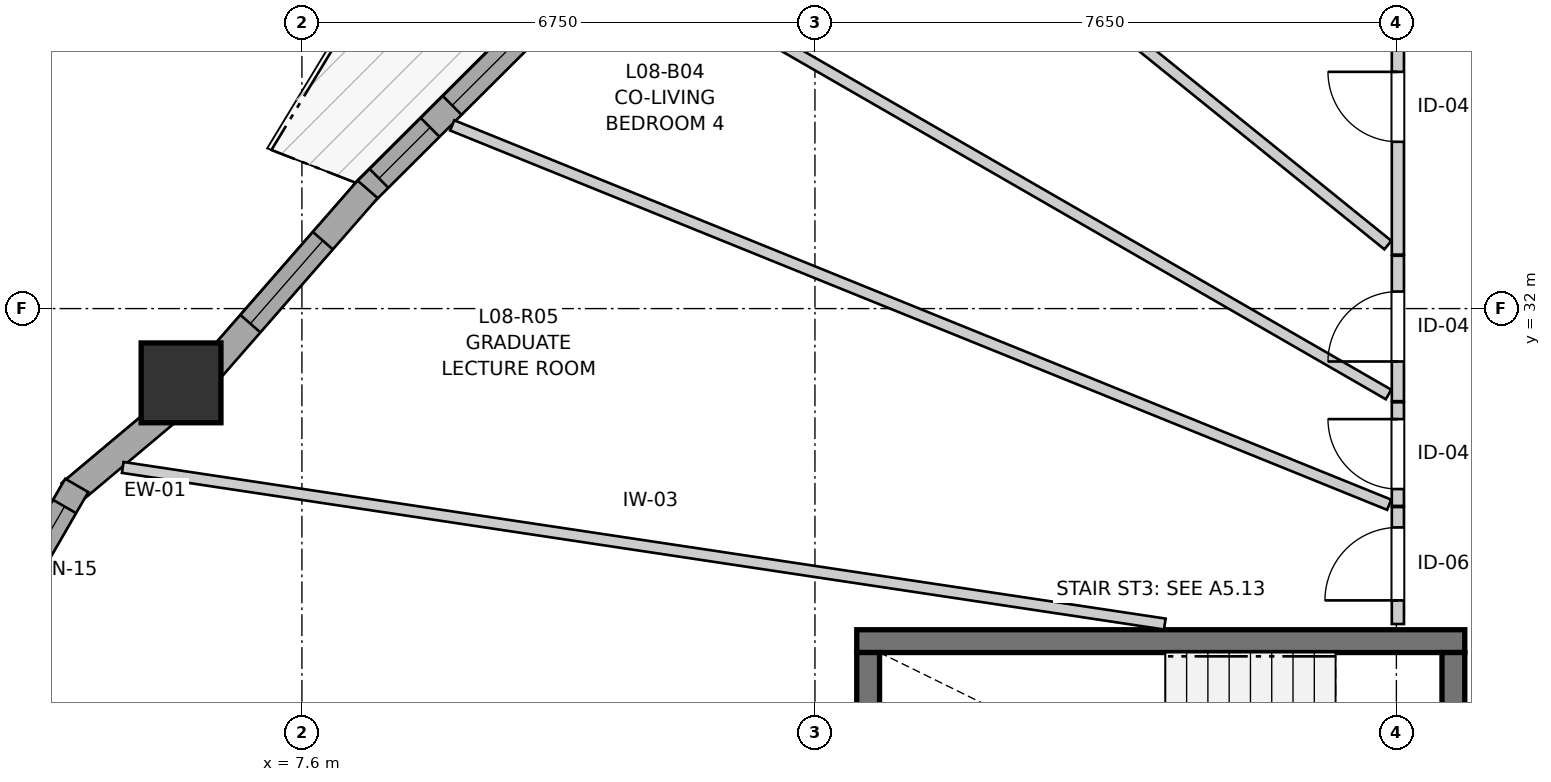
"""IFC4 building model, lengths in metres.
Left out: names, types, materials, properties, quantities, classifications, styles, units other than length and angle.
Written with IfcOpenShell. Run it as: python <this file> out.ifc"""

import sys

from ifc_helpers import new_model, si_unit, direction, frame, frame_2d, origin, origin_2d, place, context, subcontext, project, spatial, rectangle, extrude, source, transform, mapped, element, fill, save


model = new_model("IFC4")
c1 = context("Model", 3, precision=1e-05, world=origin(), true_north=direction((0.0, 1.0)))
c2 = subcontext(c1, "Body", "Model", "MODEL_VIEW")
j1 = project(units=[si_unit("LENGTHUNIT", "METRE"), si_unit("PLANEANGLEUNIT", "RADIAN")], contexts=[c1])
p1 = place(None, origin())
s1 = spatial("IfcSite", under=j1, at=p1, CompositionType="ELEMENT")
p2 = place(p1, origin())
s2 = spatial("IfcBuilding", under=s1, at=p2, CompositionType="ELEMENT")
p3 = place(p2, frame((0.0, 0.0, 30.2)))
s3 = spatial("IfcBuildingStorey", under=s2, at=p3, CompositionType="ELEMENT", Elevation=30.2)
p4 = place(p3, frame((22.9, 27.625, 0.0), z_axis=(0.0, 0.0, 1.0), x_axis=(-1.0, 0.0, 0.0)))
e1 = element("IfcWall", 1, at=p4, inside=s3, PredefinedType="SHEAR", context=c2, shape_type="SweptSolid", body=[
    extrude(rectangle(XDim=8.0, YDim=0.3, at=frame_2d((4.0, 0.0))), origin(), (0.0, 0.0, 1.0), 2.935),
])
p5 = place(p3, frame((15.05, 27.475, 0.0), z_axis=(0.0, 0.0, 1.0), x_axis=(0.0, -1.0, 0.0)))
e2 = element("IfcWall", 2, at=p5, inside=s3, PredefinedType="SHEAR", context=c2, shape_type="SweptSolid", body=[
    extrude(rectangle(XDim=2.95, YDim=0.3, at=frame_2d((1.475, 0.0))), origin(), (0.0, 0.0, 1.0), 2.935),
])
p6 = place(p3, frame((22.75, 24.525, 0.0), z_axis=(0.0, 0.0, 1.0), x_axis=(0.0, 1.0, 0.0)))
e3 = element("IfcWall", 3, at=p6, inside=s3, PredefinedType="SHEAR", context=c2, shape_type="SweptSolid", body=[
    extrude(rectangle(XDim=2.95, YDim=0.3, at=frame_2d((1.475, 0.0))), origin(), (0.0, 0.0, 1.0), 2.935),
])
p7 = place(p6, frame((0.985, 0.0, 0.0)))
e4 = element("IfcOpeningElement", 4, at=p7, cuts=e3, PredefinedType="OPENING", context=c2, shape_type="SweptSolid", body=[
    extrude(rectangle(XDim=0.98, YDim=2.15, at=frame_2d((0.49, 1.075))), frame((0.0, 0.16, 0.0), z_axis=(0.0, -1.0, 0.0), x_axis=(1.0, 0.0, 0.0)), (0.0, 0.0, 1.0), 0.32),
])
m1 = source(origin(), c2, "Body", "SweptSolid", [
    extrude(rectangle(XDim=1.05, YDim=1.05, at=origin_2d()), origin(), (0.0, 0.0, 1.0), 2.935),
])
p8 = place(p3, frame((6.01, 31.023, 0.0), z_axis=(0.0, 0.0, 1.0), x_axis=(1.0, 0.0, 0.0)))
e5 = element("IfcColumn", 5, at=p8, inside=s3, PredefinedType="COLUMN", context=c2, shape_type="MappedRepresentation", body=[
    mapped(m1, transform((0.0, 0.0, 0.0), x_axis=(1.0, 0.0, 0.0), y_axis=(0.0, 1.0, 0.0), z_axis=(0.0, 0.0, 1.0), scale=1.0)),
])
p9 = place(p3, frame((5.893, 30.696, 0.0), z_axis=(0.0, 0.0, 1.0), x_axis=(-0.766001205563, -0.64283913468, 0.0)))
e6 = element("IfcWall", 6, at=p9, inside=s3, PredefinedType="SOLIDWALL", context=c2, shape_type="SweptSolid", body=[
    extrude(rectangle(XDim=1.752, YDim=0.35, at=frame_2d((0.876, 0.0))), origin(), (0.0, 0.0, 1.0), 2.415),
])
p10 = place(p3, frame((4.637, 29.674, 0.0), z_axis=(0.0, 0.0, 1.0), x_axis=(-0.499995423472, -0.866028046028, 0.0)))
e7 = element("IfcWall", 7, at=p10, inside=s3, PredefinedType="SOLIDWALL", context=c2, shape_type="SweptSolid", body=[
    extrude(rectangle(XDim=2.09, YDim=0.35, at=frame_2d((1.045, 0.0))), origin(), (0.0, 0.0, 1.0), 2.415),
])
p11 = place(p10, frame((0.32, 0.0, 0.82)))
e8 = element("IfcOpeningElement", 8, at=p11, cuts=e7, PredefinedType="OPENING", context=c2, shape_type="SweptSolid", body=[
    extrude(rectangle(XDim=1.45, YDim=1.25, at=frame_2d((0.725, 0.625))), frame((0.0, 0.185, 0.0), z_axis=(0.0, -1.0, 0.0), x_axis=(1.0, 0.0, 0.0)), (0.0, 0.0, 1.0), 0.37),
])
p12 = place(p3, frame((10.841, 35.932, 0.0), z_axis=(0.0, 0.0, 1.0), x_axis=(-0.708383272101, -0.70582798174, 0.0)))
e9 = element("IfcWall", 9, at=p12, inside=s3, PredefinedType="SOLIDWALL", context=c2, shape_type="SweptSolid", body=[
    extrude(rectangle(XDim=3.439, YDim=0.35, at=frame_2d((1.72, 0.0))), origin(), (0.0, 0.0, 1.0), 2.415),
])
p13 = place(p12, frame((0.334, 0.0, 0.82)))
e10 = element("IfcOpeningElement", 10, at=p13, cuts=e9, PredefinedType="OPENING", context=c2, shape_type="SweptSolid", body=[
    extrude(rectangle(XDim=1.45, YDim=1.25, at=frame_2d((0.725, 0.625))), frame((0.0, 0.185, 0.0), z_axis=(0.0, -1.0, 0.0), x_axis=(1.0, 0.0, 0.0)), (0.0, 0.0, 1.0), 0.37),
])
p14 = place(p12, frame((2.194, 0.0, 0.82)))
e11 = element("IfcOpeningElement", 11, at=p14, cuts=e9, PredefinedType="OPENING", context=c2, shape_type="SweptSolid", body=[
    extrude(rectangle(XDim=0.95, YDim=1.35, at=frame_2d((0.475, 0.675))), frame((0.0, 0.185, 0.0), z_axis=(0.0, -1.0, 0.0), x_axis=(1.0, 0.0, 0.0)), (0.0, 0.0, 1.0), 0.37),
])
p15 = place(p3, frame((8.465, 33.569, 0.0), z_axis=(0.0, 0.0, 1.0), x_axis=(-0.657600500685, -0.753366830634, 0.0)))
e12 = element("IfcWall", 12, at=p15, inside=s3, PredefinedType="SOLIDWALL", context=c2, shape_type="SweptSolid", body=[
    extrude(rectangle(XDim=3.233, YDim=0.35, at=frame_2d((1.616, 0.0))), origin(), (0.0, 0.0, 1.0), 2.415),
])
p16 = place(p15, frame((0.896, 0.0, 0.82)))
e13 = element("IfcOpeningElement", 13, at=p16, cuts=e12, PredefinedType="OPENING", context=c2, shape_type="SweptSolid", body=[
    extrude(rectangle(XDim=1.45, YDim=1.25, at=frame_2d((0.725, 0.625))), frame((0.0, 0.185, 0.0), z_axis=(0.0, -1.0, 0.0), x_axis=(1.0, 0.0, 0.0)), (0.0, 0.0, 1.0), 0.37),
])
p17 = place(p3, frame((22.02, 32.71, 0.0), z_axis=(0.0, 0.0, 1.0), x_axis=(0.0, 1.0, 0.0)))
e14 = element("IfcWall", 14, at=p17, inside=s3, PredefinedType="PARTITIONING", context=c2, shape_type="SweptSolid", body=[
    extrude(rectangle(XDim=3.87, YDim=0.16, at=frame_2d((1.935, 0.0))), origin(), (0.0, 0.0, 1.0), 2.935),
])
p18 = place(p17, frame((1.485, 0.0, 0.0)))
e15 = element("IfcOpeningElement", 15, at=p18, cuts=e14, PredefinedType="OPENING", context=c2, shape_type="SweptSolid", body=[
    extrude(rectangle(XDim=0.92, YDim=2.1, at=frame_2d((0.46, 1.05))), frame((0.0, 0.09, 0.0), z_axis=(0.0, -1.0, 0.0), x_axis=(1.0, 0.0, 0.0)), (0.0, 0.0, 1.0), 0.18),
])
p19 = place(p3, frame((22.02, 30.782, 0.0), z_axis=(0.0, 0.0, 1.0), x_axis=(0.0, 1.0, 0.0)))
e16 = element("IfcWall", 16, at=p19, inside=s3, PredefinedType="PARTITIONING", context=c2, shape_type="SweptSolid", body=[
    extrude(rectangle(XDim=1.913, YDim=0.16, at=frame_2d((0.957, 0.0))), origin(), (0.0, 0.0, 1.0), 2.935),
])
p20 = place(p19, frame((0.522, 0.0, 0.0)))
e17 = element("IfcOpeningElement", 17, at=p20, cuts=e16, PredefinedType="OPENING", context=c2, shape_type="SweptSolid", body=[
    extrude(rectangle(XDim=0.92, YDim=2.1, at=frame_2d((0.46, 1.05))), frame((0.0, 0.09, 0.0), z_axis=(0.0, -1.0, 0.0), x_axis=(1.0, 0.0, 0.0)), (0.0, 0.0, 1.0), 0.18),
])
p21 = place(p3, frame((22.02, 27.85, 0.0), z_axis=(0.0, 0.0, 1.0), x_axis=(0.0, 1.0, 0.0)))
e18 = element("IfcWall", 18, at=p21, inside=s3, PredefinedType="PARTITIONING", context=c2, shape_type="SweptSolid", body=[
    extrude(rectangle(XDim=1.539, YDim=0.16, at=frame_2d((0.77, 0.0))), origin(), (0.0, 0.0, 1.0), 2.935),
])
p22 = place(p21, frame((0.311, 0.0, 0.0)))
e19 = element("IfcOpeningElement", 19, at=p22, cuts=e18, PredefinedType="OPENING", context=c2, shape_type="SweptSolid", body=[
    extrude(rectangle(XDim=0.96, YDim=2.1, at=frame_2d((0.48, 1.05))), frame((0.0, 0.09, 0.0), z_axis=(0.0, -1.0, 0.0), x_axis=(1.0, 0.0, 0.0)), (0.0, 0.0, 1.0), 0.18),
])
p23 = place(p3, frame((22.02, 29.404, 0.0), z_axis=(0.0, 0.0, 1.0), x_axis=(0.0, 1.0, 0.0)))
e20 = element("IfcWall", 20, at=p23, inside=s3, PredefinedType="PARTITIONING", context=c2, shape_type="SweptSolid", body=[
    extrude(rectangle(XDim=1.363, YDim=0.16, at=frame_2d((0.682, 0.0))), origin(), (0.0, 0.0, 1.0), 2.935),
])
p24 = place(p23, frame((0.222, 0.0, 0.0)))
e21 = element("IfcOpeningElement", 21, at=p24, cuts=e20, PredefinedType="OPENING", context=c2, shape_type="SweptSolid", body=[
    extrude(rectangle(XDim=0.92, YDim=2.1, at=frame_2d((0.46, 1.05))), frame((0.0, 0.09, 0.0), z_axis=(0.0, -1.0, 0.0), x_axis=(1.0, 0.0, 0.0)), (0.0, 0.0, 1.0), 0.18),
])
p25 = place(p3, frame((5.242, 29.91, 0.0), z_axis=(0.0, 0.0, 1.0), x_axis=(0.988899381561, -0.148586719285, 0.0)))
e22 = element("IfcWall", 22, at=p25, inside=s3, PredefinedType="PARTITIONING", context=c2, shape_type="SweptSolid", body=[
    extrude(rectangle(XDim=13.864, YDim=0.145, at=frame_2d((6.932, 0.0))), origin(), (0.0, 0.0, 1.0), 2.935),
])
p26 = place(p3, frame((9.577, 34.41, 0.0), z_axis=(0.0, 0.0, 1.0), x_axis=(0.926920362809, -0.375258099194, 0.0)))
e23 = element("IfcWall", 23, at=p26, inside=s3, PredefinedType="PARTITIONING", context=c2, shape_type="SweptSolid", body=[
    extrude(rectangle(XDim=13.3, YDim=0.145, at=frame_2d((6.65, 0.0))), origin(), (0.0, 0.0, 1.0), 2.935),
])
p27 = place(p3, frame((11.92, 36.618, 0.0), z_axis=(0.0, 0.0, 1.0), x_axis=(0.866473494239, -0.499223080177, 0.0)))
e24 = element("IfcWall", 24, at=p27, inside=s3, PredefinedType="PARTITIONING", context=c2, shape_type="SweptSolid", body=[
    extrude(rectangle(XDim=11.514, YDim=0.145, at=frame_2d((5.757, 0.0))), origin(), (0.0, 0.0, 1.0), 2.935),
])
p28 = place(p3, frame((14.566, 38.751, 0.0), z_axis=(0.0, 0.0, 1.0), x_axis=(0.777881688073, -0.628410756879, 0.0)))
e25 = element("IfcWall", 25, at=p28, inside=s3, PredefinedType="PARTITIONING", context=c2, shape_type="SweptSolid", body=[
    extrude(rectangle(XDim=9.413, YDim=0.145, at=frame_2d((4.707, 0.0))), origin(), (0.0, 0.0, 1.0), 2.935),
])
m2 = source(origin(), c2, "Body", "SweptSolid", [
    extrude(rectangle(XDim=1.45, YDim=1.25, at=frame_2d((0.725, 0.625))), frame((0.0, 0.03, 0.0), z_axis=(0.0, -1.0, 0.0), x_axis=(1.0, 0.0, 0.0)), (0.0, 0.0, 1.0), 0.06),
])
p29 = place(p11, origin())
e26 = element("IfcWindow", 26, at=p29, inside=s3, PartitioningType="SINGLE_PANEL", PredefinedType="WINDOW", context=c2, shape_type="MappedRepresentation", body=[
    mapped(m2, transform((0.0, 0.0, 0.0), x_axis=(1.0, 0.0, 0.0), y_axis=(0.0, 1.0, 0.0), z_axis=(0.0, 0.0, 1.0), scale=1.0)),
])
fill(e8, e26)
p30 = place(p13, origin())
e27 = element("IfcWindow", 27, at=p30, inside=s3, PartitioningType="SINGLE_PANEL", PredefinedType="WINDOW", context=c2, shape_type="MappedRepresentation", body=[
    mapped(m2, transform((0.0, 0.0, 0.0), x_axis=(1.0, 0.0, 0.0), y_axis=(0.0, 1.0, 0.0), z_axis=(0.0, 0.0, 1.0), scale=1.0)),
])
fill(e10, e27)
m3 = source(origin(), c2, "Body", "SweptSolid", [
    extrude(rectangle(XDim=0.95, YDim=1.35, at=frame_2d((0.475, 0.675))), frame((0.0, 0.03, 0.0), z_axis=(0.0, -1.0, 0.0), x_axis=(1.0, 0.0, 0.0)), (0.0, 0.0, 1.0), 0.06),
])
p31 = place(p14, origin())
e28 = element("IfcWindow", 28, at=p31, inside=s3, PartitioningType="SINGLE_PANEL", PredefinedType="WINDOW", context=c2, shape_type="MappedRepresentation", body=[
    mapped(m3, transform((0.0, 0.0, 0.0), x_axis=(1.0, 0.0, 0.0), y_axis=(0.0, 1.0, 0.0), z_axis=(0.0, 0.0, 1.0), scale=1.0)),
])
fill(e11, e28)
p32 = place(p16, origin())
e29 = element("IfcWindow", 29, at=p32, inside=s3, PartitioningType="SINGLE_PANEL", PredefinedType="WINDOW", context=c2, shape_type="MappedRepresentation", body=[
    mapped(m2, transform((0.0, 0.0, 0.0), x_axis=(1.0, 0.0, 0.0), y_axis=(0.0, 1.0, 0.0), z_axis=(0.0, 0.0, 1.0), scale=1.0)),
])
fill(e13, e29)
m4 = source(origin(), c2, "Body", "SweptSolid", [
    extrude(rectangle(XDim=0.92, YDim=2.1, at=frame_2d((0.46, 1.05))), frame((0.0, 0.025, 0.0), z_axis=(0.0, -1.0, 0.0), x_axis=(1.0, 0.0, 0.0)), (0.0, 0.0, 1.0), 0.05),
])
p33 = place(p18, origin())
e30 = element("IfcDoor", 30, at=p33, inside=s3, OperationType="SINGLE_SWING_RIGHT", PredefinedType="DOOR", context=c2, shape_type="MappedRepresentation", body=[
    mapped(m4, transform((0.0, 0.0, 0.0), x_axis=(1.0, 0.0, 0.0), y_axis=(0.0, 1.0, 0.0), z_axis=(0.0, 0.0, 1.0), scale=1.0)),
])
fill(e15, e30)
p34 = place(p20, origin())
e31 = element("IfcDoor", 31, at=p34, inside=s3, OperationType="SINGLE_SWING_LEFT", PredefinedType="DOOR", context=c2, shape_type="MappedRepresentation", body=[
    mapped(m4, transform((0.0, 0.0, 0.0), x_axis=(1.0, 0.0, 0.0), y_axis=(0.0, 1.0, 0.0), z_axis=(0.0, 0.0, 1.0), scale=1.0)),
])
fill(e17, e31)
m5 = source(origin(), c2, "Body", "SweptSolid", [
    extrude(rectangle(XDim=0.96, YDim=2.1, at=frame_2d((0.48, 1.05))), frame((0.0, 0.025, 0.0), z_axis=(0.0, -1.0, 0.0), x_axis=(1.0, 0.0, 0.0)), (0.0, 0.0, 1.0), 0.05),
])
p35 = place(p22, origin())
e32 = element("IfcDoor", 32, at=p35, inside=s3, OperationType="SINGLE_SWING_LEFT", PredefinedType="DOOR", context=c2, shape_type="MappedRepresentation", body=[
    mapped(m5, transform((0.0, 0.0, 0.0), x_axis=(1.0, 0.0, 0.0), y_axis=(0.0, 1.0, 0.0), z_axis=(0.0, 0.0, 1.0), scale=1.0)),
])
fill(e19, e32)
p36 = place(p24, origin())
e33 = element("IfcDoor", 33, at=p36, inside=s3, OperationType="SINGLE_SWING_RIGHT", PredefinedType="DOOR", context=c2, shape_type="MappedRepresentation", body=[
    mapped(m4, transform((0.0, 0.0, 0.0), x_axis=(1.0, 0.0, 0.0), y_axis=(0.0, 1.0, 0.0), z_axis=(0.0, 0.0, 1.0), scale=1.0)),
])
fill(e21, e33)
save(model, sys.argv[1])
